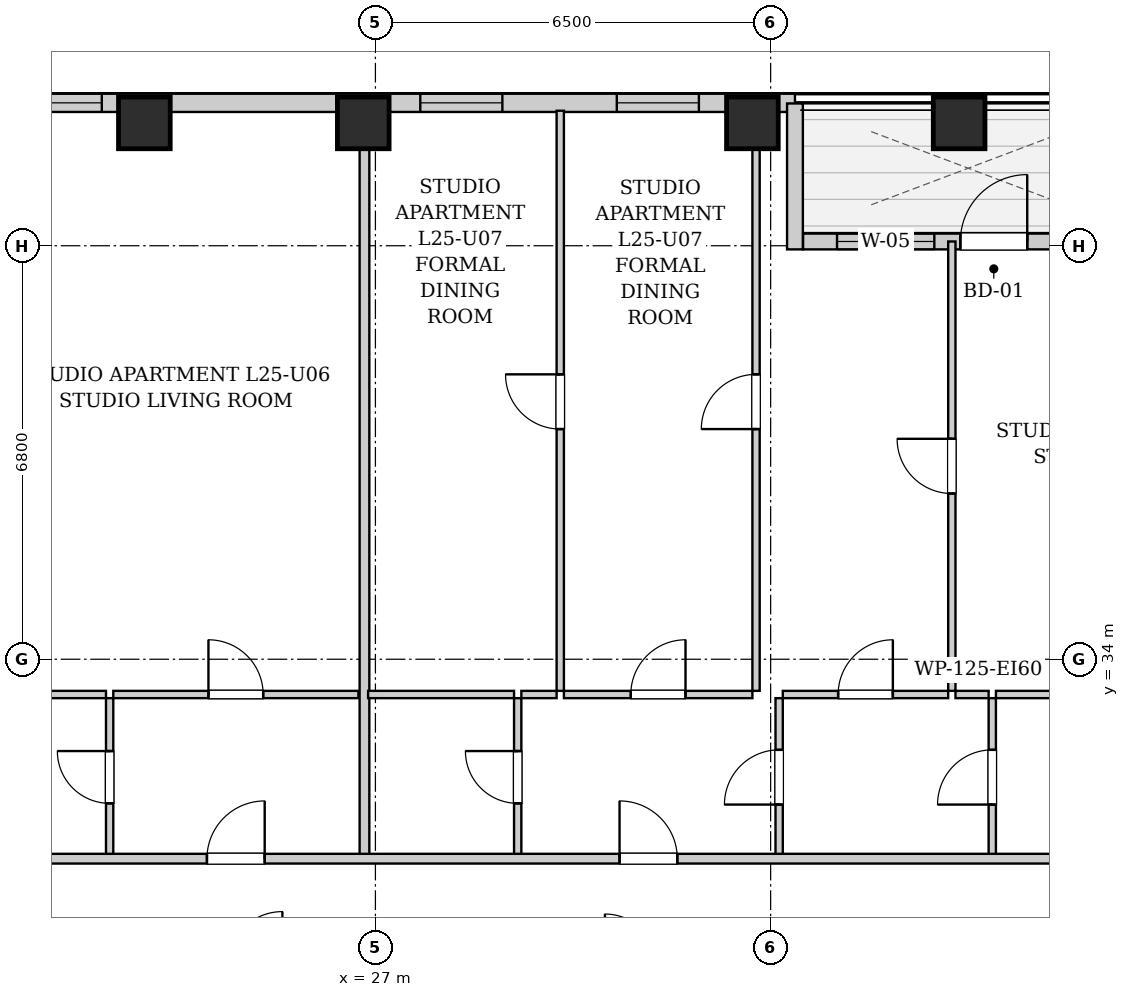
"""IFC4 building model, lengths in metres.
Left out: names, types, materials, properties, quantities, classifications, styles, units other than length and angle.
Written with IfcOpenShell. Run it as: python <this file> out.ifc"""

import sys

from ifc_helpers import new_model, si_unit, direction, frame, frame_2d, origin, origin_2d, place, context, subcontext, project, spatial, rectangle, extrude, element, fill, save


model = new_model("IFC4")
c1 = context("Model", 3, precision=1e-05, world=origin(), true_north=direction((0.0, 1.0)))
c2 = subcontext(c1, "Body", "Model", "MODEL_VIEW")
j1 = project(units=[si_unit("LENGTHUNIT", "METRE"), si_unit("PLANEANGLEUNIT", "RADIAN")], contexts=[c1])
p1 = place(None, origin())
s1 = spatial("IfcSite", under=j1, at=p1, CompositionType="ELEMENT")
p2 = place(p1, origin())
s2 = spatial("IfcBuilding", under=s1, at=p2, CompositionType="ELEMENT")
p3 = place(p2, frame((0.0, 0.0, 91.1)))
s3 = spatial("IfcBuildingStorey", under=s2, at=p3, CompositionType="ELEMENT", Elevation=91.1)
for number, where, z_axis, x_axis in (
    (1, (23.2, 42.82, 0.0), (0.0, 0.0, 1.0), (1.0, 0.0, 0.0)),
    (2, (26.8, 42.82, 0.0), (0.0, 0.0, 1.0), (1.0, 0.0, 0.0)),
    (3, (33.2, 42.82, 0.0), (0.0, 0.0, 1.0), (1.0, 0.0, 0.0)),
    (4, (36.6, 42.82, 0.0), (0.0, 0.0, 1.0), (1.0, 0.0, 0.0)),
):
    element("IfcColumn", number, at=place(p3, frame(where, z_axis=z_axis, x_axis=x_axis)), inside=s3, PredefinedType="COLUMN", context=c2, shape_type="SweptSolid", body=[
        extrude(rectangle(XDim=0.85, YDim=0.85, at=origin_2d()), origin(), (0.0, 0.0, 1.0), 3.2),
    ])
p4 = place(p3, frame((10.0, 43.15, 0.0), z_axis=(0.0, 0.0, 1.0), x_axis=(1.0, 0.0, 0.0)))
e5 = element("IfcWall", 5, at=p4, inside=s3, PredefinedType="SOLIDWALL", context=c2, shape_type="SweptSolid", body=[
    extrude(rectangle(XDim=23.9, YDim=0.3, at=frame_2d((11.95, 0.0))), origin(), (0.0, 0.0, 1.0), 2.94),
])
p5 = place(p4, frame((5.337, 0.0, 0.55)))
e6 = element("IfcOpeningElement", 6, at=p5, cuts=e5, PredefinedType="OPENING", context=c2, shape_type="SweptSolid", body=[
    extrude(rectangle(XDim=1.35, YDim=1.2, at=frame_2d((0.675, 0.6))), frame((0.0, 0.16, 0.0), z_axis=(0.0, -1.0, 0.0), x_axis=(1.0, 0.0, 0.0)), (0.0, 0.0, 1.0), 0.32),
])
p6 = place(p4, frame((8.494, 0.0, 0.55)))
e7 = element("IfcOpeningElement", 7, at=p6, cuts=e5, PredefinedType="OPENING", context=c2, shape_type="SweptSolid", body=[
    extrude(rectangle(XDim=1.35, YDim=1.2, at=frame_2d((0.675, 0.6))), frame((0.0, 0.16, 0.0), z_axis=(0.0, -1.0, 0.0), x_axis=(1.0, 0.0, 0.0)), (0.0, 0.0, 1.0), 0.32),
])
p7 = place(p4, frame((11.15, 0.0, 0.55)))
e8 = element("IfcOpeningElement", 8, at=p7, cuts=e5, PredefinedType="OPENING", context=c2, shape_type="SweptSolid", body=[
    extrude(rectangle(XDim=1.35, YDim=1.2, at=frame_2d((0.675, 0.6))), frame((0.0, 0.16, 0.0), z_axis=(0.0, -1.0, 0.0), x_axis=(1.0, 0.0, 0.0)), (0.0, 0.0, 1.0), 0.32),
])
p8 = place(p4, frame((17.738, 0.0, 0.55)))
e9 = element("IfcOpeningElement", 9, at=p8, cuts=e5, PredefinedType="OPENING", context=c2, shape_type="SweptSolid", body=[
    extrude(rectangle(XDim=1.35, YDim=1.2, at=frame_2d((0.675, 0.6))), frame((0.0, 0.16, 0.0), z_axis=(0.0, -1.0, 0.0), x_axis=(1.0, 0.0, 0.0)), (0.0, 0.0, 1.0), 0.32),
])
p9 = place(p4, frame((20.97, 0.0, 0.55)))
e10 = element("IfcOpeningElement", 10, at=p9, cuts=e5, PredefinedType="OPENING", context=c2, shape_type="SweptSolid", body=[
    extrude(rectangle(XDim=1.35, YDim=1.2, at=frame_2d((0.675, 0.6))), frame((0.0, 0.16, 0.0), z_axis=(0.0, -1.0, 0.0), x_axis=(1.0, 0.0, 0.0)), (0.0, 0.0, 1.0), 0.32),
])
p10 = place(p3, frame((33.9, 43.14, 0.0), z_axis=(0.0, 0.0, 1.0), x_axis=(0.0, -1.0, 0.0)))
e11 = element("IfcWall", 11, at=p10, inside=s3, PredefinedType="SOLIDWALL", context=c2, shape_type="SweptSolid", body=[
    extrude(rectangle(XDim=2.4, YDim=0.26, at=frame_2d((1.2, 0.0))), origin(), (0.0, 0.0, 1.0), 2.94),
])
p11 = place(p3, frame((34.034, 40.87, 0.0), z_axis=(0.0, 0.0, 1.0), x_axis=(1.0, 0.0, 0.0)))
e12 = element("IfcWall", 12, at=p11, inside=s3, PredefinedType="SOLIDWALL", context=c2, shape_type="SweptSolid", body=[
    extrude(rectangle(XDim=5.432, YDim=0.26, at=frame_2d((2.716, 0.0))), origin(), (0.0, 0.0, 1.0), 2.94),
])
p12 = place(p11, frame((2.586, 0.0, 0.0)))
e13 = element("IfcOpeningElement", 13, at=p12, cuts=e12, PredefinedType="OPENING", context=c2, shape_type="SweptSolid", body=[
    extrude(rectangle(XDim=1.1, YDim=2.0, at=frame_2d((0.55, 1.0))), frame((0.0, 0.14, 0.0), z_axis=(0.0, -1.0, 0.0), x_axis=(1.0, 0.0, 0.0)), (0.0, 0.0, 1.0), 0.28),
])
p13 = place(p11, frame((0.558, 0.0, 0.85)))
e14 = element("IfcOpeningElement", 14, at=p13, cuts=e12, PredefinedType="OPENING", context=c2, shape_type="SweptSolid", body=[
    extrude(rectangle(XDim=1.6, YDim=1.65, at=frame_2d((0.8, 0.825))), frame((0.0, 0.14, 0.0), z_axis=(0.0, -1.0, 0.0), x_axis=(1.0, 0.0, 0.0)), (0.0, 0.0, 1.0), 0.28),
])
p14 = place(p3, frame((22.629, 30.76, 0.0), z_axis=(0.0, 0.0, 1.0), x_axis=(0.0, 1.0, 0.0)))
e15 = element("IfcWall", 15, at=p14, inside=s3, PredefinedType="PARTITIONING", context=c2, shape_type="SweptSolid", body=[
    extrude(rectangle(XDim=2.6, YDim=0.12, at=frame_2d((1.3, 0.0))), origin(), (0.0, 0.0, 1.0), 2.94),
])
p15 = place(p14, frame((0.87, 0.0, 0.0)))
e16 = element("IfcOpeningElement", 16, at=p15, cuts=e15, PredefinedType="OPENING", context=c2, shape_type="SweptSolid", body=[
    extrude(rectangle(XDim=0.86, YDim=2.05, at=frame_2d((0.43, 1.025))), frame((0.0, 0.07, 0.0), z_axis=(0.0, -1.0, 0.0), x_axis=(1.0, 0.0, 0.0)), (0.0, 0.0, 1.0), 0.14),
])
p16 = place(p3, frame((20.719, 33.42, 0.0), z_axis=(0.0, 0.0, 1.0), x_axis=(1.0, 0.0, 0.0)))
e17 = element("IfcWall", 17, at=p16, inside=s3, PredefinedType="PARTITIONING", context=c2, shape_type="SweptSolid", body=[
    extrude(rectangle(XDim=1.85, YDim=0.12, at=frame_2d((0.925, 0.0))), origin(), (0.0, 0.0, 1.0), 2.94),
])
p17 = place(p3, frame((22.689, 33.42, 0.0), z_axis=(0.0, 0.0, 1.0), x_axis=(1.0, 0.0, 0.0)))
e18 = element("IfcWall", 18, at=p17, inside=s3, PredefinedType="PARTITIONING", context=c2, shape_type="SweptSolid", body=[
    extrude(rectangle(XDim=4.031, YDim=0.12, at=frame_2d((2.016, 0.0))), origin(), (0.0, 0.0, 1.0), 2.94),
])
p18 = place(p17, frame((1.565, 0.0, 0.0)))
e19 = element("IfcOpeningElement", 19, at=p18, cuts=e18, PredefinedType="OPENING", context=c2, shape_type="SweptSolid", body=[
    extrude(rectangle(XDim=0.9, YDim=2.05, at=frame_2d((0.45, 1.025))), frame((0.0, 0.07, 0.0), z_axis=(0.0, -1.0, 0.0), x_axis=(1.0, 0.0, 0.0)), (0.0, 0.0, 1.0), 0.14),
])
p19 = place(p3, frame((26.82, 30.76, 0.0), z_axis=(0.0, 0.0, 1.0), x_axis=(0.0, 1.0, 0.0)))
e20 = element("IfcWall", 20, at=p19, inside=s3, PredefinedType="PARTITIONING", context=c2, shape_type="SweptSolid", body=[
    extrude(rectangle(XDim=12.26, YDim=0.16, at=frame_2d((6.13, 0.0))), origin(), (0.0, 0.0, 1.0), 2.94),
])
p20 = place(p3, frame((29.34, 30.76, 0.0), z_axis=(0.0, 0.0, 1.0), x_axis=(0.0, 1.0, 0.0)))
e21 = element("IfcWall", 21, at=p20, inside=s3, PredefinedType="PARTITIONING", context=c2, shape_type="SweptSolid", body=[
    extrude(rectangle(XDim=2.6, YDim=0.12, at=frame_2d((1.3, 0.0))), origin(), (0.0, 0.0, 1.0), 2.94),
])
p21 = place(p20, frame((0.87, 0.0, 0.0)))
e22 = element("IfcOpeningElement", 22, at=p21, cuts=e21, PredefinedType="OPENING", context=c2, shape_type="SweptSolid", body=[
    extrude(rectangle(XDim=0.86, YDim=2.05, at=frame_2d((0.43, 1.025))), frame((0.0, 0.07, 0.0), z_axis=(0.0, -1.0, 0.0), x_axis=(1.0, 0.0, 0.0)), (0.0, 0.0, 1.0), 0.14),
])
p22 = place(p3, frame((26.88, 33.42, 0.0), z_axis=(0.0, 0.0, 1.0), x_axis=(1.0, 0.0, 0.0)))
e23 = element("IfcWall", 23, at=p22, inside=s3, PredefinedType="PARTITIONING", context=c2, shape_type="SweptSolid", body=[
    extrude(rectangle(XDim=2.4, YDim=0.12, at=frame_2d((1.2, 0.0))), origin(), (0.0, 0.0, 1.0), 2.94),
])
p23 = place(p3, frame((33.64, 30.76, 0.0), z_axis=(0.0, 0.0, 1.0), x_axis=(0.0, 1.0, 0.0)))
e24 = element("IfcWall", 24, at=p23, inside=s3, PredefinedType="PARTITIONING", context=c2, shape_type="SweptSolid", body=[
    extrude(rectangle(XDim=2.6, YDim=0.12, at=frame_2d((1.3, 0.0))), origin(), (0.0, 0.0, 1.0), 2.94),
])
p24 = place(p23, frame((0.85, 0.0, 0.0)))
e25 = element("IfcOpeningElement", 25, at=p24, cuts=e24, PredefinedType="OPENING", context=c2, shape_type="SweptSolid", body=[
    extrude(rectangle(XDim=0.9, YDim=2.05, at=frame_2d((0.45, 1.025))), frame((0.0, 0.07, 0.0), z_axis=(0.0, -1.0, 0.0), x_axis=(1.0, 0.0, 0.0)), (0.0, 0.0, 1.0), 0.14),
])
p25 = place(p3, frame((29.4, 33.42, 0.0), z_axis=(0.0, 0.0, 1.0), x_axis=(1.0, 0.0, 0.0)))
e26 = element("IfcWall", 26, at=p25, inside=s3, PredefinedType="PARTITIONING", context=c2, shape_type="SweptSolid", body=[
    extrude(rectangle(XDim=0.58, YDim=0.12, at=frame_2d((0.29, 0.0))), origin(), (0.0, 0.0, 1.0), 2.94),
])
p26 = place(p3, frame((30.1, 33.42, 0.0), z_axis=(0.0, 0.0, 1.0), x_axis=(1.0, 0.0, 0.0)))
e27 = element("IfcWall", 27, at=p26, inside=s3, PredefinedType="PARTITIONING", context=c2, shape_type="SweptSolid", body=[
    extrude(rectangle(XDim=3.1, YDim=0.12, at=frame_2d((1.55, 0.0))), origin(), (0.0, 0.0, 1.0), 2.94),
])
p27 = place(p26, frame((1.1, 0.0, 0.0)))
e28 = element("IfcOpeningElement", 28, at=p27, cuts=e27, PredefinedType="OPENING", context=c2, shape_type="SweptSolid", body=[
    extrude(rectangle(XDim=0.9, YDim=2.05, at=frame_2d((0.45, 1.025))), frame((0.0, 0.07, 0.0), z_axis=(0.0, -1.0, 0.0), x_axis=(1.0, 0.0, 0.0)), (0.0, 0.0, 1.0), 0.14),
])
p28 = place(p3, frame((37.145, 30.76, 0.0), z_axis=(0.0, 0.0, 1.0), x_axis=(0.0, 1.0, 0.0)))
e29 = element("IfcWall", 29, at=p28, inside=s3, PredefinedType="PARTITIONING", context=c2, shape_type="SweptSolid", body=[
    extrude(rectangle(XDim=2.6, YDim=0.12, at=frame_2d((1.3, 0.0))), origin(), (0.0, 0.0, 1.0), 2.94),
])
p29 = place(p28, frame((0.85, 0.0, 0.0)))
e30 = element("IfcOpeningElement", 30, at=p29, cuts=e29, PredefinedType="OPENING", context=c2, shape_type="SweptSolid", body=[
    extrude(rectangle(XDim=0.9, YDim=2.05, at=frame_2d((0.45, 1.025))), frame((0.0, 0.07, 0.0), z_axis=(0.0, -1.0, 0.0), x_axis=(1.0, 0.0, 0.0)), (0.0, 0.0, 1.0), 0.14),
])
p30 = place(p3, frame((33.7, 33.42, 0.0), z_axis=(0.0, 0.0, 1.0), x_axis=(1.0, 0.0, 0.0)))
e31 = element("IfcWall", 31, at=p30, inside=s3, PredefinedType="PARTITIONING", context=c2, shape_type="SweptSolid", body=[
    extrude(rectangle(XDim=2.72, YDim=0.12, at=frame_2d((1.36, 0.0))), origin(), (0.0, 0.0, 1.0), 2.94),
])
p31 = place(p30, frame((0.91, 0.0, 0.0)))
e32 = element("IfcOpeningElement", 32, at=p31, cuts=e31, PredefinedType="OPENING", context=c2, shape_type="SweptSolid", body=[
    extrude(rectangle(XDim=0.9, YDim=2.05, at=frame_2d((0.45, 1.025))), frame((0.0, 0.07, 0.0), z_axis=(0.0, -1.0, 0.0), x_axis=(1.0, 0.0, 0.0)), (0.0, 0.0, 1.0), 0.14),
])
p32 = place(p3, frame((36.54, 33.42, 0.0), z_axis=(0.0, 0.0, 1.0), x_axis=(1.0, 0.0, 0.0)))
e33 = element("IfcWall", 33, at=p32, inside=s3, PredefinedType="PARTITIONING", context=c2, shape_type="SweptSolid", body=[
    extrude(rectangle(XDim=0.545, YDim=0.12, at=frame_2d((0.272, 0.0))), origin(), (0.0, 0.0, 1.0), 2.94),
])
p33 = place(p3, frame((37.205, 33.42, 0.0), z_axis=(0.0, 0.0, 1.0), x_axis=(1.0, 0.0, 0.0)))
e34 = element("IfcWall", 34, at=p33, inside=s3, PredefinedType="PARTITIONING", context=c2, shape_type="SweptSolid", body=[
    extrude(rectangle(XDim=3.615, YDim=0.12, at=frame_2d((1.808, 0.0))), origin(), (0.0, 0.0, 1.0), 2.94),
])
p34 = place(p33, frame((1.358, 0.0, 0.0)))
e35 = element("IfcOpeningElement", 35, at=p34, cuts=e34, PredefinedType="OPENING", context=c2, shape_type="SweptSolid", body=[
    extrude(rectangle(XDim=0.9, YDim=2.05, at=frame_2d((0.45, 1.025))), frame((0.0, 0.07, 0.0), z_axis=(0.0, -1.0, 0.0), x_axis=(1.0, 0.0, 0.0)), (0.0, 0.0, 1.0), 0.14),
])
p35 = place(p3, frame((30.04, 33.48, 0.0), z_axis=(0.0, 0.0, 1.0), x_axis=(0.0, 1.0, 0.0)))
e36 = element("IfcWall", 36, at=p35, inside=s3, PredefinedType="PARTITIONING", context=c2, shape_type="SweptSolid", body=[
    extrude(rectangle(XDim=9.54, YDim=0.12, at=frame_2d((4.77, 0.0))), origin(), (0.0, 0.0, 1.0), 2.94),
])
p36 = place(p35, frame((4.305, 0.0, 0.0)))
e37 = element("IfcOpeningElement", 37, at=p36, cuts=e36, PredefinedType="OPENING", context=c2, shape_type="SweptSolid", body=[
    extrude(rectangle(XDim=0.9, YDim=2.05, at=frame_2d((0.45, 1.025))), frame((0.0, 0.07, 0.0), z_axis=(0.0, -1.0, 0.0), x_axis=(1.0, 0.0, 0.0)), (0.0, 0.0, 1.0), 0.14),
])
p37 = place(p3, frame((33.26, 33.48, 0.0), z_axis=(0.0, 0.0, 1.0), x_axis=(0.0, 1.0, 0.0)))
e38 = element("IfcWall", 38, at=p37, inside=s3, PredefinedType="PARTITIONING", context=c2, shape_type="SweptSolid", body=[
    extrude(rectangle(XDim=9.54, YDim=0.12, at=frame_2d((4.77, 0.0))), origin(), (0.0, 0.0, 1.0), 2.309),
])
p38 = place(p37, frame((4.305, 0.0, 0.0)))
e39 = element("IfcOpeningElement", 39, at=p38, cuts=e38, PredefinedType="OPENING", context=c2, shape_type="SweptSolid", body=[
    extrude(rectangle(XDim=0.9, YDim=2.05, at=frame_2d((0.45, 1.025))), frame((0.0, 0.07, 0.0), z_axis=(0.0, -1.0, 0.0), x_axis=(1.0, 0.0, 0.0)), (0.0, 0.0, 1.0), 0.14),
])
p39 = place(p3, frame((36.48, 33.48, 0.0), z_axis=(0.0, 0.0, 1.0), x_axis=(0.0, 1.0, 0.0)))
e40 = element("IfcWall", 40, at=p39, inside=s3, PredefinedType="PARTITIONING", context=c2, shape_type="SweptSolid", body=[
    extrude(rectangle(XDim=7.39, YDim=0.12, at=frame_2d((3.695, 0.0))), origin(), (0.0, 0.0, 1.0), 2.94),
])
p40 = place(p39, frame((3.245, 0.0, 0.0)))
e41 = element("IfcOpeningElement", 41, at=p40, cuts=e40, PredefinedType="OPENING", context=c2, shape_type="SweptSolid", body=[
    extrude(rectangle(XDim=0.9, YDim=2.05, at=frame_2d((0.45, 1.025))), frame((0.0, 0.07, 0.0), z_axis=(0.0, -1.0, 0.0), x_axis=(1.0, 0.0, 0.0)), (0.0, 0.0, 1.0), 0.14),
])
p41 = place(p3, frame((10.05, 30.72, 0.0), z_axis=(0.0, 0.0, 1.0), x_axis=(1.0, 0.0, 0.0)))
e42 = element("IfcWall", 42, at=p41, inside=s3, PredefinedType="PARTITIONING", context=c2, shape_type="SweptSolid", body=[
    extrude(rectangle(XDim=30.8, YDim=0.16, at=frame_2d((15.4, 0.0))), origin(), (0.0, 0.0, 1.0), 2.94),
])
p42 = place(p41, frame((4.295, 0.0, 0.0)))
e43 = element("IfcOpeningElement", 43, at=p42, cuts=e42, PredefinedType="OPENING", context=c2, shape_type="SweptSolid", body=[
    extrude(rectangle(XDim=0.95, YDim=2.1, at=frame_2d((0.475, 1.05))), frame((0.0, 0.09, 0.0), z_axis=(0.0, -1.0, 0.0), x_axis=(1.0, 0.0, 0.0)), (0.0, 0.0, 1.0), 0.18),
])
p43 = place(p41, frame((14.179, 0.0, 0.0)))
e44 = element("IfcOpeningElement", 44, at=p43, cuts=e42, PredefinedType="OPENING", context=c2, shape_type="SweptSolid", body=[
    extrude(rectangle(XDim=0.95, YDim=2.1, at=frame_2d((0.475, 1.05))), frame((0.0, 0.09, 0.0), z_axis=(0.0, -1.0, 0.0), x_axis=(1.0, 0.0, 0.0)), (0.0, 0.0, 1.0), 0.18),
])
p44 = place(p41, frame((20.965, 0.0, 0.0)))
e45 = element("IfcOpeningElement", 45, at=p44, cuts=e42, PredefinedType="OPENING", context=c2, shape_type="SweptSolid", body=[
    extrude(rectangle(XDim=0.95, YDim=2.1, at=frame_2d((0.475, 1.05))), frame((0.0, 0.09, 0.0), z_axis=(0.0, -1.0, 0.0), x_axis=(1.0, 0.0, 0.0)), (0.0, 0.0, 1.0), 0.18),
])
p45 = place(p15, origin())
e46 = element("IfcDoor", 46, at=p45, inside=s3, OperationType="SINGLE_SWING_RIGHT", PredefinedType="DOOR", context=c2, shape_type="SweptSolid", body=[
    extrude(rectangle(XDim=0.86, YDim=2.05, at=frame_2d((0.43, 1.025))), frame((0.0, 0.025, 0.0), z_axis=(0.0, -1.0, 0.0), x_axis=(1.0, 0.0, 0.0)), (0.0, 0.0, 1.0), 0.05),
])
fill(e16, e46)
p46 = place(p18, origin())
e47 = element("IfcDoor", 47, at=p46, inside=s3, OperationType="SINGLE_SWING_LEFT", PredefinedType="DOOR", context=c2, shape_type="SweptSolid", body=[
    extrude(rectangle(XDim=0.9, YDim=2.05, at=frame_2d((0.45, 1.025))), frame((0.0, 0.025, 0.0), z_axis=(0.0, -1.0, 0.0), x_axis=(1.0, 0.0, 0.0)), (0.0, 0.0, 1.0), 0.05),
])
fill(e19, e47)
p47 = place(p21, origin())
e48 = element("IfcDoor", 48, at=p47, inside=s3, OperationType="SINGLE_SWING_RIGHT", PredefinedType="DOOR", context=c2, shape_type="SweptSolid", body=[
    extrude(rectangle(XDim=0.86, YDim=2.05, at=frame_2d((0.43, 1.025))), frame((0.0, 0.025, 0.0), z_axis=(0.0, -1.0, 0.0), x_axis=(1.0, 0.0, 0.0)), (0.0, 0.0, 1.0), 0.05),
])
fill(e22, e48)
p48 = place(p24, origin())
e49 = element("IfcDoor", 49, at=p48, inside=s3, OperationType="SINGLE_SWING_LEFT", PredefinedType="DOOR", context=c2, shape_type="SweptSolid", body=[
    extrude(rectangle(XDim=0.9, YDim=2.05, at=frame_2d((0.45, 1.025))), frame((0.0, 0.025, 0.0), z_axis=(0.0, -1.0, 0.0), x_axis=(1.0, 0.0, 0.0)), (0.0, 0.0, 1.0), 0.05),
])
fill(e25, e49)
p49 = place(p27, origin())
e50 = element("IfcDoor", 50, at=p49, inside=s3, OperationType="SINGLE_SWING_RIGHT", PredefinedType="DOOR", context=c2, shape_type="SweptSolid", body=[
    extrude(rectangle(XDim=0.9, YDim=2.05, at=frame_2d((0.45, 1.025))), frame((0.0, 0.025, 0.0), z_axis=(0.0, -1.0, 0.0), x_axis=(1.0, 0.0, 0.0)), (0.0, 0.0, 1.0), 0.05),
])
fill(e28, e50)
p50 = place(p29, origin())
e51 = element("IfcDoor", 51, at=p50, inside=s3, OperationType="SINGLE_SWING_LEFT", PredefinedType="DOOR", context=c2, shape_type="SweptSolid", body=[
    extrude(rectangle(XDim=0.9, YDim=2.05, at=frame_2d((0.45, 1.025))), frame((0.0, 0.025, 0.0), z_axis=(0.0, -1.0, 0.0), x_axis=(1.0, 0.0, 0.0)), (0.0, 0.0, 1.0), 0.05),
])
fill(e30, e51)
p51 = place(p31, origin())
e52 = element("IfcDoor", 52, at=p51, inside=s3, OperationType="SINGLE_SWING_RIGHT", PredefinedType="DOOR", context=c2, shape_type="SweptSolid", body=[
    extrude(rectangle(XDim=0.9, YDim=2.05, at=frame_2d((0.45, 1.025))), frame((0.0, 0.025, 0.0), z_axis=(0.0, -1.0, 0.0), x_axis=(1.0, 0.0, 0.0)), (0.0, 0.0, 1.0), 0.05),
])
fill(e32, e52)
p52 = place(p36, origin())
e53 = element("IfcDoor", 53, at=p52, inside=s3, OperationType="SINGLE_SWING_RIGHT", PredefinedType="DOOR", context=c2, shape_type="SweptSolid", body=[
    extrude(rectangle(XDim=0.9, YDim=2.05, at=frame_2d((0.45, 1.025))), frame((0.0, 0.025, 0.0), z_axis=(0.0, -1.0, 0.0), x_axis=(1.0, 0.0, 0.0)), (0.0, 0.0, 1.0), 0.05),
])
fill(e37, e53)
p53 = place(p38, origin())
e54 = element("IfcDoor", 54, at=p53, inside=s3, OperationType="SINGLE_SWING_LEFT", PredefinedType="DOOR", context=c2, shape_type="SweptSolid", body=[
    extrude(rectangle(XDim=0.9, YDim=2.05, at=frame_2d((0.45, 1.025))), frame((0.0, 0.025, 0.0), z_axis=(0.0, -1.0, 0.0), x_axis=(1.0, 0.0, 0.0)), (0.0, 0.0, 1.0), 0.05),
])
fill(e39, e54)
p54 = place(p40, origin())
e55 = element("IfcDoor", 55, at=p54, inside=s3, OperationType="SINGLE_SWING_RIGHT", PredefinedType="DOOR", context=c2, shape_type="SweptSolid", body=[
    extrude(rectangle(XDim=0.9, YDim=2.05, at=frame_2d((0.45, 1.025))), frame((0.0, 0.025, 0.0), z_axis=(0.0, -1.0, 0.0), x_axis=(1.0, 0.0, 0.0)), (0.0, 0.0, 1.0), 0.05),
])
fill(e41, e55)
p55 = place(p43, origin())
e56 = element("IfcDoor", 56, at=p55, inside=s3, OperationType="SINGLE_SWING_RIGHT", PredefinedType="DOOR", context=c2, shape_type="SweptSolid", body=[
    extrude(rectangle(XDim=0.95, YDim=2.1, at=frame_2d((0.475, 1.05))), frame((0.0, 0.025, 0.0), z_axis=(0.0, -1.0, 0.0), x_axis=(1.0, 0.0, 0.0)), (0.0, 0.0, 1.0), 0.05),
])
fill(e44, e56)
p56 = place(p44, origin())
e57 = element("IfcDoor", 57, at=p56, inside=s3, OperationType="SINGLE_SWING_LEFT", PredefinedType="DOOR", context=c2, shape_type="SweptSolid", body=[
    extrude(rectangle(XDim=0.95, YDim=2.1, at=frame_2d((0.475, 1.05))), frame((0.0, 0.025, 0.0), z_axis=(0.0, -1.0, 0.0), x_axis=(1.0, 0.0, 0.0)), (0.0, 0.0, 1.0), 0.05),
])
fill(e45, e57)
p57 = place(p12, origin())
e58 = element("IfcDoor", 58, at=p57, inside=s3, OperationType="SINGLE_SWING_RIGHT", PredefinedType="DOOR", context=c2, shape_type="SweptSolid", body=[
    extrude(rectangle(XDim=1.1, YDim=2.0, at=frame_2d((0.55, 1.0))), frame((0.0, 0.025, 0.0), z_axis=(0.0, -1.0, 0.0), x_axis=(1.0, 0.0, 0.0)), (0.0, 0.0, 1.0), 0.05),
])
fill(e13, e58)
p58 = place(p7, origin())
e59 = element("IfcWindow", 59, at=p58, inside=s3, PartitioningType="SINGLE_PANEL", PredefinedType="WINDOW", context=c2, shape_type="SweptSolid", body=[
    extrude(rectangle(XDim=1.35, YDim=1.2, at=frame_2d((0.675, 0.6))), frame((0.0, 0.03, 0.0), z_axis=(0.0, -1.0, 0.0), x_axis=(1.0, 0.0, 0.0)), (0.0, 0.0, 1.0), 0.06),
])
fill(e8, e59)
p59 = place(p8, origin())
e60 = element("IfcWindow", 60, at=p59, inside=s3, PartitioningType="SINGLE_PANEL", PredefinedType="WINDOW", context=c2, shape_type="SweptSolid", body=[
    extrude(rectangle(XDim=1.35, YDim=1.2, at=frame_2d((0.675, 0.6))), frame((0.0, 0.03, 0.0), z_axis=(0.0, -1.0, 0.0), x_axis=(1.0, 0.0, 0.0)), (0.0, 0.0, 1.0), 0.06),
])
fill(e9, e60)
p60 = place(p9, origin())
e61 = element("IfcWindow", 61, at=p60, inside=s3, PartitioningType="SINGLE_PANEL", PredefinedType="WINDOW", context=c2, shape_type="SweptSolid", body=[
    extrude(rectangle(XDim=1.35, YDim=1.2, at=frame_2d((0.675, 0.6))), frame((0.0, 0.03, 0.0), z_axis=(0.0, -1.0, 0.0), x_axis=(1.0, 0.0, 0.0)), (0.0, 0.0, 1.0), 0.06),
])
fill(e10, e61)
p61 = place(p13, origin())
e62 = element("IfcWindow", 62, at=p61, inside=s3, PartitioningType="DOUBLE_PANEL_VERTICAL", PredefinedType="WINDOW", context=c2, shape_type="SweptSolid", body=[
    extrude(rectangle(XDim=1.6, YDim=1.65, at=frame_2d((0.8, 0.825))), frame((0.0, 0.03, 0.0), z_axis=(0.0, -1.0, 0.0), x_axis=(1.0, 0.0, 0.0)), (0.0, 0.0, 1.0), 0.06),
])
fill(e14, e62)
save(model, sys.argv[1])
